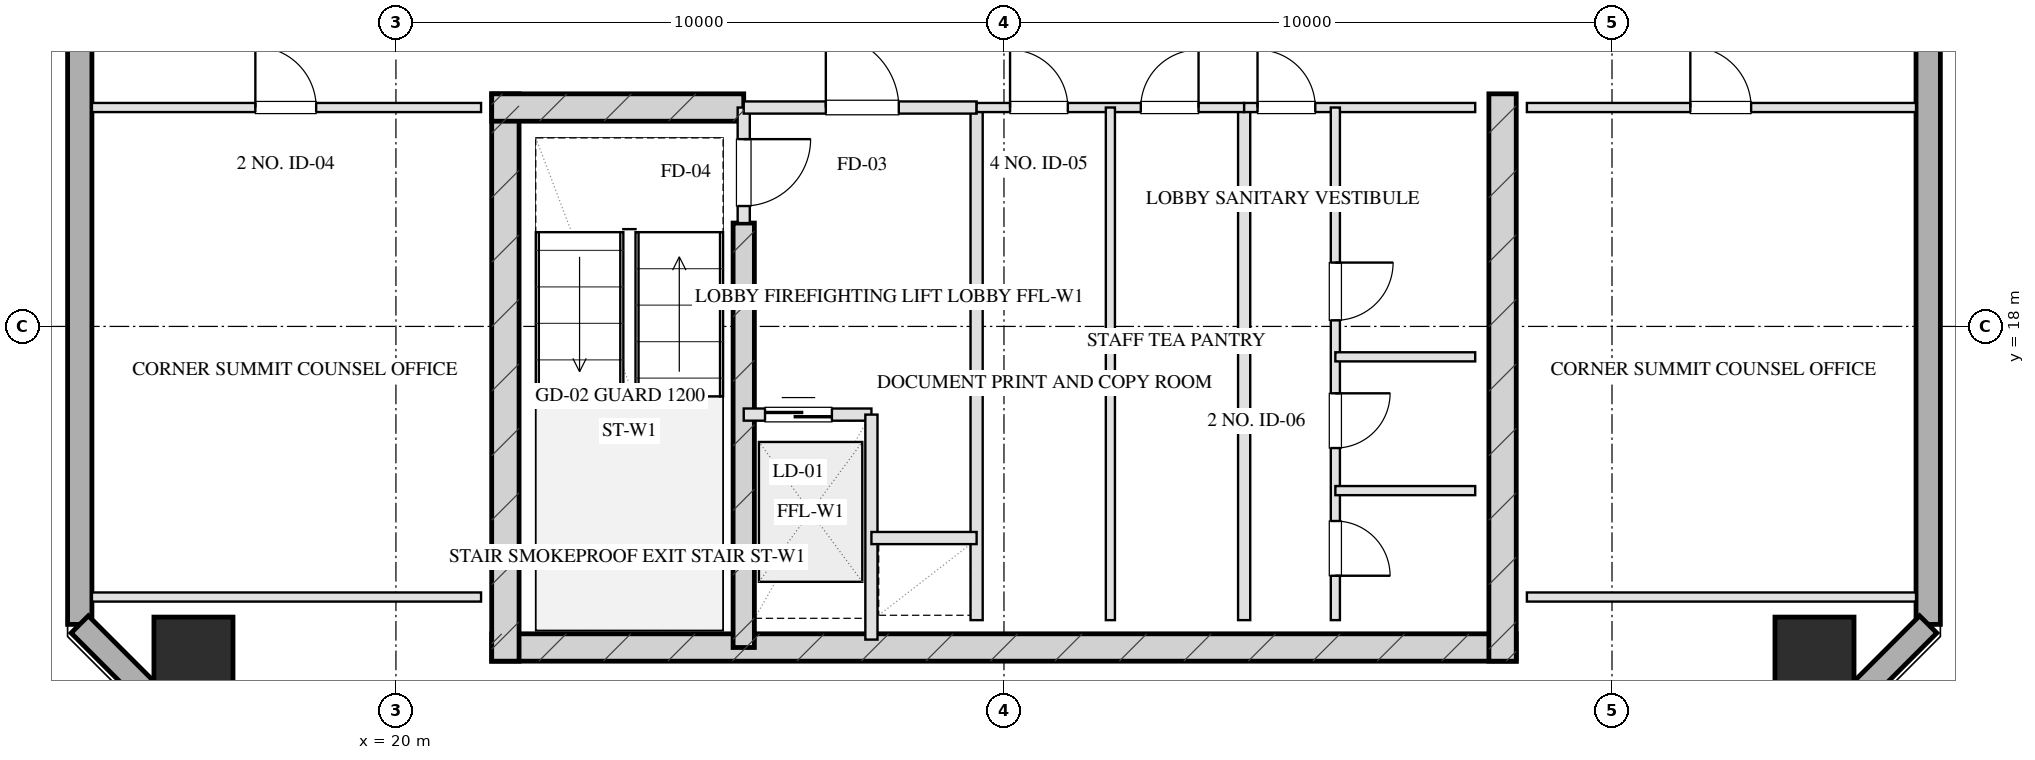
"""IFC4 building model, lengths in metres.
Left out: names, types, materials, properties, quantities, classifications, styles, units other than length and angle.
Written with IfcOpenShell. Run it as: python <this file> out.ifc"""

import sys

from ifc_helpers import new_model, si_unit, direction, frame, frame_2d, origin, origin_2d, place, context, subcontext, project, spatial, rectangle, hollow_rectangle, extrude, element, fill, save


model = new_model("IFC4")
c1 = context("Model", 3, precision=1e-05, world=origin(), true_north=direction((0.0, 1.0)))
c2 = subcontext(c1, "Body", "Model", "MODEL_VIEW")
j1 = project(units=[si_unit("LENGTHUNIT", "METRE"), si_unit("PLANEANGLEUNIT", "RADIAN")], contexts=[c1])
p1 = place(None, origin())
s1 = spatial("IfcSite", under=j1, at=p1, CompositionType="ELEMENT")
p2 = place(p1, origin())
s2 = spatial("IfcBuilding", under=s1, at=p2, CompositionType="ELEMENT")
p3 = place(p2, frame((0.0, 0.0, 260.0)))
s3 = spatial("IfcBuildingStorey", under=s2, at=p3, CompositionType="ELEMENT", Elevation=260.0)
p4 = place(p3, frame((21.575, 12.72, 0.0), z_axis=(0.0, 0.0, 1.0), x_axis=(1.0, 0.0, 0.0)))
e1 = element("IfcWall", 1, at=p4, inside=s3, PredefinedType="SHEAR", context=c2, shape_type="SweptSolid", body=[
    extrude(rectangle(XDim=16.85, YDim=0.45, at=frame_2d((8.425, 0.0))), origin(), (0.0, 0.0, 1.0), 3.2),
])
for number, where, z_axis, x_axis in (
    (2, (21.8, 21.825, 0.0), (0.0, 0.0, 1.0), (0.0, -1.0, 0.0)),
    (3, (38.2, 21.825, 0.0), (0.0, 0.0, 1.0), (0.0, -1.0, 0.0)),
):
    element("IfcWall", number, at=place(p3, frame(where, z_axis=z_axis, x_axis=x_axis)), inside=s3, PredefinedType="SHEAR", context=c2, shape_type="SweptSolid", body=[
        extrude(rectangle(XDim=9.33, YDim=0.45, at=frame_2d((4.665, 0.0))), origin(), (0.0, 0.0, 1.0), 3.2),
    ])
p5 = place(p3, frame((25.72, 19.7, 0.0), z_axis=(0.0, 0.0, 1.0), x_axis=(0.0, -1.0, 0.0)))
e4 = element("IfcWall", 4, at=p5, inside=s3, PredefinedType="SHEAR", context=c2, shape_type="SweptSolid", body=[
    extrude(rectangle(XDim=6.98, YDim=0.35, at=frame_2d((3.49, 0.0))), origin(), (0.0, 0.0, 1.0), 3.2),
])
p6 = place(p3, frame((21.575, 21.6, 0.0), z_axis=(0.0, 0.0, 1.0), x_axis=(1.0, 0.0, 0.0)))
e5 = element("IfcWall", 5, at=p6, inside=s3, PredefinedType="SHEAR", context=c2, shape_type="SweptSolid", body=[
    extrude(rectangle(XDim=4.145, YDim=0.45, at=frame_2d((2.073, 0.0))), origin(), (0.0, 0.0, 1.0), 3.2),
])
for number, where, z_axis, x_axis in (
    (6, (16.67, 12.57, 0.0), (0.0, 0.0, 1.0), (1.0, 0.0, 0.0)),
    (7, (43.33, 12.57, 0.0), (0.0, 0.0, 1.0), (1.0, 0.0, 0.0)),
):
    element("IfcColumn", number, at=place(p3, frame(where, z_axis=z_axis, x_axis=x_axis)), inside=s3, PredefinedType="COLUMN", context=c2, shape_type="SweptSolid", body=[
        extrude(hollow_rectangle(XDim=1.3, YDim=1.3, WallThickness=0.045, at=origin_2d()), origin(), (0.0, 0.0, 1.0), 3.201),
    ])
p7 = place(p3, frame((14.8, 13.1, 0.0), z_axis=(0.0, 0.0, 1.0), x_axis=(0.0, 1.0, 0.0)))
e8 = element("IfcWall", 8, at=p7, inside=s3, PredefinedType="SOLIDWALL", context=c2, shape_type="SweptSolid", body=[
    extrude(rectangle(XDim=41.8, YDim=0.4, at=frame_2d((20.9, 0.0))), origin(), (0.0, 0.0, 1.0), 2.36),
])
p8 = place(p7, frame((13.525, 0.0, 0.75)))
e9 = element("IfcOpeningElement", 9, at=p8, cuts=e8, PredefinedType="OPENING", context=c2, shape_type="SweptSolid", body=[
    extrude(rectangle(XDim=1.95, YDim=1.21, at=frame_2d((0.975, 0.605))), frame((0.0, 0.21, 0.0), z_axis=(0.0, -1.0, 0.0), x_axis=(1.0, 0.0, 0.0)), (0.0, 0.0, 1.0), 0.42),
])
p9 = place(p7, frame((17.325, 0.0, 0.75)))
e10 = element("IfcOpeningElement", 10, at=p9, cuts=e8, PredefinedType="OPENING", context=c2, shape_type="SweptSolid", body=[
    extrude(rectangle(XDim=1.95, YDim=1.21, at=frame_2d((0.975, 0.605))), frame((0.0, 0.21, 0.0), z_axis=(0.0, -1.0, 0.0), x_axis=(1.0, 0.0, 0.0)), (0.0, 0.0, 1.0), 0.42),
])
p10 = place(p7, frame((23.43, 0.0, 0.0)))
e11 = element("IfcOpeningElement", 11, at=p10, cuts=e8, PredefinedType="OPENING", context=c2, shape_type="SweptSolid", body=[
    extrude(rectangle(XDim=1.1, YDim=2.15, at=frame_2d((0.55, 1.075))), frame((0.0, 0.21, 0.0), z_axis=(0.0, -1.0, 0.0), x_axis=(1.0, 0.0, 0.0)), (0.0, 0.0, 1.0), 0.42),
])
p11 = place(p3, frame((45.2, 54.9, 0.0), z_axis=(0.0, 0.0, 1.0), x_axis=(0.0, -1.0, 0.0)))
e12 = element("IfcWall", 12, at=p11, inside=s3, PredefinedType="SOLIDWALL", context=c2, shape_type="SweptSolid", body=[
    extrude(rectangle(XDim=41.8, YDim=0.4, at=frame_2d((20.9, 0.0))), origin(), (0.0, 0.0, 1.0), 2.36),
])
p12 = place(p11, frame((26.325, 0.0, 0.75)))
e13 = element("IfcOpeningElement", 13, at=p12, cuts=e12, PredefinedType="OPENING", context=c2, shape_type="SweptSolid", body=[
    extrude(rectangle(XDim=1.95, YDim=1.21, at=frame_2d((0.975, 0.605))), frame((0.0, 0.21, 0.0), z_axis=(0.0, -1.0, 0.0), x_axis=(1.0, 0.0, 0.0)), (0.0, 0.0, 1.0), 0.42),
])
p13 = place(p11, frame((22.525, 0.0, 0.75)))
e14 = element("IfcOpeningElement", 14, at=p13, cuts=e12, PredefinedType="OPENING", context=c2, shape_type="SweptSolid", body=[
    extrude(rectangle(XDim=1.95, YDim=1.21, at=frame_2d((0.975, 0.605))), frame((0.0, 0.21, 0.0), z_axis=(0.0, -1.0, 0.0), x_axis=(1.0, 0.0, 0.0)), (0.0, 0.0, 1.0), 0.42),
])
p14 = place(p11, frame((17.25, 0.0, 0.0)))
e15 = element("IfcOpeningElement", 15, at=p14, cuts=e12, PredefinedType="OPENING", context=c2, shape_type="SweptSolid", body=[
    extrude(rectangle(XDim=1.1, YDim=2.15, at=frame_2d((0.55, 1.075))), frame((0.0, 0.21, 0.0), z_axis=(0.0, -1.0, 0.0), x_axis=(1.0, 0.0, 0.0)), (0.0, 0.0, 1.0), 0.42),
])
for number, where, z_axis, x_axis in (
    (16, (45.2, 13.1, 0.0), (0.0, 0.0, 1.0), (-0.707, -0.707, 0.0)),
    (17, (17.2, 10.7, 0.0), (0.0, 0.0, 1.0), (-0.707, 0.707, 0.0)),
):
    element("IfcWall", number, at=place(p3, frame(where, z_axis=z_axis, x_axis=x_axis)), inside=s3, PredefinedType="SOLIDWALL", context=c2, shape_type="SweptSolid", body=[
        extrude(rectangle(XDim=3.394, YDim=0.4, at=frame_2d((1.697, 0.0))), origin(), (0.0, 0.0, 1.0), 2.36),
    ])
p15 = place(p3, frame((25.72, 21.6, 0.0), z_axis=(0.0, 0.0, 1.0), x_axis=(0.0, -1.0, 0.0)))
e18 = element("IfcWall", 18, at=p15, inside=s3, PredefinedType="PARTITIONING", context=c2, shape_type="SweptSolid", body=[
    extrude(rectangle(XDim=1.9, YDim=0.2, at=frame_2d((0.95, 0.0))), origin(), (0.0, 0.0, 1.0), 2.925),
])
p16 = place(p15, frame((0.52, 0.0, 0.0)))
e19 = element("IfcOpeningElement", 19, at=p16, cuts=e18, PredefinedType="OPENING", context=c2, shape_type="SweptSolid", body=[
    extrude(rectangle(XDim=1.1, YDim=2.05, at=frame_2d((0.55, 1.025))), frame((0.0, 0.11, 0.0), z_axis=(0.0, -1.0, 0.0), x_axis=(1.0, 0.0, 0.0)), (0.0, 0.0, 1.0), 0.22),
])
p17 = place(p3, frame((29.55, 21.6, 0.0), z_axis=(0.0, 0.0, 1.0), x_axis=(0.0, -1.0, 0.0)))
e20 = element("IfcWall", 20, at=p17, inside=s3, PredefinedType="PARTITIONING", context=c2, shape_type="SweptSolid", body=[
    extrude(rectangle(XDim=8.43, YDim=0.2, at=frame_2d((4.215, 0.0))), origin(), (0.0, 0.0, 1.0), 2.925),
])
p18 = place(p3, frame((25.72, 21.6, 0.0), z_axis=(0.0, 0.0, 1.0), x_axis=(1.0, 0.0, 0.0)))
e21 = element("IfcWall", 21, at=p18, inside=s3, PredefinedType="PARTITIONING", context=c2, shape_type="SweptSolid", body=[
    extrude(rectangle(XDim=3.83, YDim=0.2, at=frame_2d((1.915, 0.0))), origin(), (0.0, 0.0, 1.0), 2.925),
])
p19 = place(p18, frame((1.35, 0.0, 0.0)))
e22 = element("IfcOpeningElement", 22, at=p19, cuts=e21, PredefinedType="OPENING", context=c2, shape_type="SweptSolid", body=[
    extrude(rectangle(XDim=1.2, YDim=2.05, at=frame_2d((0.6, 1.025))), frame((0.0, 0.11, 0.0), z_axis=(0.0, -1.0, 0.0), x_axis=(1.0, 0.0, 0.0)), (0.0, 0.0, 1.0), 0.22),
])
p20 = place(p3, frame((25.72, 16.55, 0.0), z_axis=(0.0, 0.0, 1.0), x_axis=(1.0, 0.0, 0.0)))
e23 = element("IfcWall", 23, at=p20, inside=s3, PredefinedType="PARTITIONING", context=c2, shape_type="SweptSolid", body=[
    extrude(rectangle(XDim=2.1, YDim=0.2, at=frame_2d((1.05, 0.0))), origin(), (0.0, 0.0, 1.0), 2.925),
])
p21 = place(p20, frame((0.35, 0.0, 0.0)))
e24 = element("IfcOpeningElement", 24, at=p21, cuts=e23, PredefinedType="OPENING", context=c2, shape_type="SweptSolid", body=[
    extrude(rectangle(XDim=1.1, YDim=2.05, at=frame_2d((0.55, 1.025))), frame((0.0, 0.11, 0.0), z_axis=(0.0, -1.0, 0.0), x_axis=(1.0, 0.0, 0.0)), (0.0, 0.0, 1.0), 0.22),
])
p22 = place(p3, frame((27.82, 16.55, 0.0), z_axis=(0.0, 0.0, 1.0), x_axis=(0.0, -1.0, 0.0)))
e25 = element("IfcWall", 25, at=p22, inside=s3, PredefinedType="PARTITIONING", context=c2, shape_type="SweptSolid", body=[
    extrude(rectangle(XDim=3.7, YDim=0.2, at=frame_2d((1.85, 0.0))), origin(), (0.0, 0.0, 1.0), 2.925),
])
p23 = place(p3, frame((27.82, 14.52, 0.0), z_axis=(0.0, 0.0, 1.0), x_axis=(1.0, 0.0, 0.0)))
e26 = element("IfcWall", 26, at=p23, inside=s3, PredefinedType="PARTITIONING", context=c2, shape_type="SweptSolid", body=[
    extrude(rectangle(XDim=1.73, YDim=0.2, at=frame_2d((0.865, 0.0))), origin(), (0.0, 0.0, 1.0), 2.925),
])
p24 = place(p3, frame((33.95, 21.6, 0.0), z_axis=(0.0, 0.0, 1.0), x_axis=(0.0, -1.0, 0.0)))
e27 = element("IfcWall", 27, at=p24, inside=s3, PredefinedType="PARTITIONING", context=c2, shape_type="SweptSolid", body=[
    extrude(rectangle(XDim=8.43, YDim=0.2, at=frame_2d((4.215, 0.0))), origin(), (0.0, 0.0, 1.0), 2.925),
])
p25 = place(p3, frame((29.55, 21.6, 0.0), z_axis=(0.0, 0.0, 1.0), x_axis=(1.0, 0.0, 0.0)))
e28 = element("IfcWall", 28, at=p25, inside=s3, PredefinedType="PARTITIONING", context=c2, shape_type="SweptSolid", body=[
    extrude(rectangle(XDim=4.4, YDim=0.15, at=frame_2d((2.2, 0.0))), origin(), (0.0, 0.0, 1.0), 2.925),
])
p26 = place(p25, frame((0.55, 0.0, 0.0)))
e29 = element("IfcOpeningElement", 29, at=p26, cuts=e28, PredefinedType="OPENING", context=c2, shape_type="SweptSolid", body=[
    extrude(rectangle(XDim=0.95, YDim=2.05, at=frame_2d((0.475, 1.025))), frame((0.0, 0.085, 0.0), z_axis=(0.0, -1.0, 0.0), x_axis=(1.0, 0.0, 0.0)), (0.0, 0.0, 1.0), 0.17),
])
p27 = place(p25, frame((2.7, 0.0, 0.0)))
e30 = element("IfcOpeningElement", 30, at=p27, cuts=e28, PredefinedType="OPENING", context=c2, shape_type="SweptSolid", body=[
    extrude(rectangle(XDim=0.95, YDim=2.05, at=frame_2d((0.475, 1.025))), frame((0.0, 0.085, 0.0), z_axis=(0.0, -1.0, 0.0), x_axis=(1.0, 0.0, 0.0)), (0.0, 0.0, 1.0), 0.17),
])
p28 = place(p3, frame((31.75, 21.6, 0.0), z_axis=(0.0, 0.0, 1.0), x_axis=(0.0, -1.0, 0.0)))
e31 = element("IfcWall", 31, at=p28, inside=s3, PredefinedType="PARTITIONING", context=c2, shape_type="SweptSolid", body=[
    extrude(rectangle(XDim=8.43, YDim=0.15, at=frame_2d((4.215, 0.0))), origin(), (0.0, 0.0, 1.0), 2.925),
])
p29 = place(p3, frame((33.95, 21.6, 0.0), z_axis=(0.0, 0.0, 1.0), x_axis=(1.0, 0.0, 0.0)))
e32 = element("IfcWall", 32, at=p29, inside=s3, PredefinedType="PARTITIONING", context=c2, shape_type="SweptSolid", body=[
    extrude(rectangle(XDim=3.8, YDim=0.15, at=frame_2d((1.9, 0.0))), origin(), (0.0, 0.0, 1.0), 2.925),
])
p30 = place(p29, frame((0.22, 0.0, 0.0)))
e33 = element("IfcOpeningElement", 33, at=p30, cuts=e32, PredefinedType="OPENING", context=c2, shape_type="SweptSolid", body=[
    extrude(rectangle(XDim=0.95, YDim=2.05, at=frame_2d((0.475, 1.025))), frame((0.0, 0.085, 0.0), z_axis=(0.0, -1.0, 0.0), x_axis=(1.0, 0.0, 0.0)), (0.0, 0.0, 1.0), 0.17),
])
p31 = place(p3, frame((35.45, 21.6, 0.0), z_axis=(0.0, 0.0, 1.0), x_axis=(0.0, -1.0, 0.0)))
e34 = element("IfcWall", 34, at=p31, inside=s3, PredefinedType="PARTITIONING", context=c2, shape_type="SweptSolid", body=[
    extrude(rectangle(XDim=8.43, YDim=0.15, at=frame_2d((4.215, 0.0))), origin(), (0.0, 0.0, 1.0), 2.565),
])
p32 = place(p31, frame((2.55, 0.0, 0.0)))
e35 = element("IfcOpeningElement", 35, at=p32, cuts=e34, PredefinedType="OPENING", context=c2, shape_type="SweptSolid", body=[
    extrude(rectangle(XDim=0.95, YDim=2.05, at=frame_2d((0.475, 1.025))), frame((0.0, 0.085, 0.0), z_axis=(0.0, -1.0, 0.0), x_axis=(1.0, 0.0, 0.0)), (0.0, 0.0, 1.0), 0.17),
])
p33 = place(p31, frame((4.7, 0.0, 0.0)))
e36 = element("IfcOpeningElement", 36, at=p33, cuts=e34, PredefinedType="OPENING", context=c2, shape_type="SweptSolid", body=[
    extrude(rectangle(XDim=0.9, YDim=2.05, at=frame_2d((0.45, 1.025))), frame((0.0, 0.085, 0.0), z_axis=(0.0, -1.0, 0.0), x_axis=(1.0, 0.0, 0.0)), (0.0, 0.0, 1.0), 0.17),
])
p34 = place(p31, frame((6.8, 0.0, 0.0)))
e37 = element("IfcOpeningElement", 37, at=p34, cuts=e34, PredefinedType="OPENING", context=c2, shape_type="SweptSolid", body=[
    extrude(rectangle(XDim=0.9, YDim=2.05, at=frame_2d((0.45, 1.025))), frame((0.0, 0.085, 0.0), z_axis=(0.0, -1.0, 0.0), x_axis=(1.0, 0.0, 0.0)), (0.0, 0.0, 1.0), 0.17),
])
for number, where, z_axis, x_axis in (
    (38, (35.45, 17.5, 0.0), (0.0, 0.0, 1.0), (1.0, 0.0, 0.0)),
    (39, (35.45, 15.3, 0.0), (0.0, 0.0, 1.0), (1.0, 0.0, 0.0)),
):
    element("IfcWall", number, at=place(p3, frame(where, z_axis=z_axis, x_axis=x_axis)), inside=s3, PredefinedType="PARTITIONING", context=c2, shape_type="SweptSolid", body=[
        extrude(rectangle(XDim=2.3, YDim=0.15, at=frame_2d((1.15, 0.0))), origin(), (0.0, 0.0, 1.0), 2.925),
    ])
p35 = place(p3, frame((15.0, 13.55, 0.0), z_axis=(0.0, 0.0, 1.0), x_axis=(1.0, 0.0, 0.0)))
e40 = element("IfcWall", 40, at=p35, inside=s3, PredefinedType="PARTITIONING", context=c2, shape_type="SweptSolid", body=[
    extrude(rectangle(XDim=6.4, YDim=0.15, at=frame_2d((3.2, 0.0))), origin(), (0.0, 0.0, 1.0), 2.925),
])
p36 = place(p3, frame((15.0, 21.6, 0.0), z_axis=(0.0, 0.0, 1.0), x_axis=(1.0, 0.0, 0.0)))
e41 = element("IfcWall", 41, at=p36, inside=s3, PredefinedType="PARTITIONING", context=c2, shape_type="SweptSolid", body=[
    extrude(rectangle(XDim=6.4, YDim=0.15, at=frame_2d((3.2, 0.0))), origin(), (0.0, 0.0, 1.0), 2.925),
])
p37 = place(p36, frame((2.688, 0.0, 0.0)))
e42 = element("IfcOpeningElement", 42, at=p37, cuts=e41, PredefinedType="OPENING", context=c2, shape_type="SweptSolid", body=[
    extrude(rectangle(XDim=1.0, YDim=2.05, at=frame_2d((0.5, 1.025))), frame((0.0, 0.085, 0.0), z_axis=(0.0, -1.0, 0.0), x_axis=(1.0, 0.0, 0.0)), (0.0, 0.0, 1.0), 0.17),
])
p38 = place(p3, frame((38.6, 13.55, 0.0), z_axis=(0.0, 0.0, 1.0), x_axis=(1.0, 0.0, 0.0)))
e43 = element("IfcWall", 43, at=p38, inside=s3, PredefinedType="PARTITIONING", context=c2, shape_type="SweptSolid", body=[
    extrude(rectangle(XDim=6.4, YDim=0.15, at=frame_2d((3.2, 0.0))), origin(), (0.0, 0.0, 1.0), 2.925),
])
p39 = place(p3, frame((38.6, 21.6, 0.0), z_axis=(0.0, 0.0, 1.0), x_axis=(1.0, 0.0, 0.0)))
e44 = element("IfcWall", 44, at=p39, inside=s3, PredefinedType="PARTITIONING", context=c2, shape_type="SweptSolid", body=[
    extrude(rectangle(XDim=6.4, YDim=0.15, at=frame_2d((3.2, 0.0))), origin(), (0.0, 0.0, 1.0), 2.925),
])
p40 = place(p39, frame((2.688, 0.0, 0.0)))
e45 = element("IfcOpeningElement", 45, at=p40, cuts=e44, PredefinedType="OPENING", context=c2, shape_type="SweptSolid", body=[
    extrude(rectangle(XDim=1.0, YDim=2.05, at=frame_2d((0.5, 1.025))), frame((0.0, 0.085, 0.0), z_axis=(0.0, -1.0, 0.0), x_axis=(1.0, 0.0, 0.0)), (0.0, 0.0, 1.0), 0.17),
])
p41 = place(p16, origin())
e46 = element("IfcDoor", 46, at=p41, inside=s3, OperationType="SINGLE_SWING_LEFT", PredefinedType="DOOR", context=c2, shape_type="SweptSolid", body=[
    extrude(rectangle(XDim=1.1, YDim=2.05, at=frame_2d((0.55, 1.025))), frame((0.0, 0.025, 0.0), z_axis=(0.0, -1.0, 0.0), x_axis=(1.0, 0.0, 0.0)), (0.0, 0.0, 1.0), 0.05),
])
fill(e19, e46)
p42 = place(p19, origin())
e47 = element("IfcDoor", 47, at=p42, inside=s3, OperationType="SINGLE_SWING_LEFT", PredefinedType="DOOR", context=c2, shape_type="SweptSolid", body=[
    extrude(rectangle(XDim=1.2, YDim=2.05, at=frame_2d((0.6, 1.025))), frame((0.0, 0.025, 0.0), z_axis=(0.0, -1.0, 0.0), x_axis=(1.0, 0.0, 0.0)), (0.0, 0.0, 1.0), 0.05),
])
fill(e22, e47)
p43 = place(p21, origin())
e48 = element("IfcDoor", 48, at=p43, inside=s3, OperationType="DOUBLE_DOOR_SLIDING", PredefinedType="DOOR", context=c2, shape_type="SweptSolid", body=[
    extrude(rectangle(XDim=1.1, YDim=2.05, at=frame_2d((0.55, 1.025))), frame((0.0, 0.025, 0.0), z_axis=(0.0, -1.0, 0.0), x_axis=(1.0, 0.0, 0.0)), (0.0, 0.0, 1.0), 0.05),
])
fill(e24, e48)
p44 = place(p26, origin())
e49 = element("IfcDoor", 49, at=p44, inside=s3, OperationType="SINGLE_SWING_LEFT", PredefinedType="DOOR", context=c2, shape_type="SweptSolid", body=[
    extrude(rectangle(XDim=0.95, YDim=2.05, at=frame_2d((0.475, 1.025))), frame((0.0, 0.025, 0.0), z_axis=(0.0, -1.0, 0.0), x_axis=(1.0, 0.0, 0.0)), (0.0, 0.0, 1.0), 0.05),
])
fill(e29, e49)
p45 = place(p27, origin())
e50 = element("IfcDoor", 50, at=p45, inside=s3, OperationType="SINGLE_SWING_RIGHT", PredefinedType="DOOR", context=c2, shape_type="SweptSolid", body=[
    extrude(rectangle(XDim=0.95, YDim=2.05, at=frame_2d((0.475, 1.025))), frame((0.0, 0.025, 0.0), z_axis=(0.0, -1.0, 0.0), x_axis=(1.0, 0.0, 0.0)), (0.0, 0.0, 1.0), 0.05),
])
fill(e30, e50)
p46 = place(p30, origin())
e51 = element("IfcDoor", 51, at=p46, inside=s3, OperationType="SINGLE_SWING_LEFT", PredefinedType="DOOR", context=c2, shape_type="SweptSolid", body=[
    extrude(rectangle(XDim=0.95, YDim=2.05, at=frame_2d((0.475, 1.025))), frame((0.0, 0.025, 0.0), z_axis=(0.0, -1.0, 0.0), x_axis=(1.0, 0.0, 0.0)), (0.0, 0.0, 1.0), 0.05),
])
fill(e33, e51)
p47 = place(p32, origin())
e52 = element("IfcDoor", 52, at=p47, inside=s3, OperationType="SINGLE_SWING_LEFT", PredefinedType="DOOR", context=c2, shape_type="SweptSolid", body=[
    extrude(rectangle(XDim=0.95, YDim=2.05, at=frame_2d((0.475, 1.025))), frame((0.0, 0.025, 0.0), z_axis=(0.0, -1.0, 0.0), x_axis=(1.0, 0.0, 0.0)), (0.0, 0.0, 1.0), 0.05),
])
fill(e35, e52)
p48 = place(p33, origin())
e53 = element("IfcDoor", 53, at=p48, inside=s3, OperationType="SINGLE_SWING_LEFT", PredefinedType="DOOR", context=c2, shape_type="SweptSolid", body=[
    extrude(rectangle(XDim=0.9, YDim=2.05, at=frame_2d((0.45, 1.025))), frame((0.0, 0.025, 0.0), z_axis=(0.0, -1.0, 0.0), x_axis=(1.0, 0.0, 0.0)), (0.0, 0.0, 1.0), 0.05),
])
fill(e36, e53)
p49 = place(p34, origin())
e54 = element("IfcDoor", 54, at=p49, inside=s3, OperationType="SINGLE_SWING_RIGHT", PredefinedType="DOOR", context=c2, shape_type="SweptSolid", body=[
    extrude(rectangle(XDim=0.9, YDim=2.05, at=frame_2d((0.45, 1.025))), frame((0.0, 0.025, 0.0), z_axis=(0.0, -1.0, 0.0), x_axis=(1.0, 0.0, 0.0)), (0.0, 0.0, 1.0), 0.05),
])
fill(e37, e54)
p50 = place(p37, origin())
e55 = element("IfcDoor", 55, at=p50, inside=s3, OperationType="SINGLE_SWING_LEFT", PredefinedType="DOOR", context=c2, shape_type="SweptSolid", body=[
    extrude(rectangle(XDim=1.0, YDim=2.05, at=frame_2d((0.5, 1.025))), frame((0.0, 0.025, 0.0), z_axis=(0.0, -1.0, 0.0), x_axis=(1.0, 0.0, 0.0)), (0.0, 0.0, 1.0), 0.05),
])
fill(e42, e55)
p51 = place(p40, origin())
e56 = element("IfcDoor", 56, at=p51, inside=s3, OperationType="SINGLE_SWING_LEFT", PredefinedType="DOOR", context=c2, shape_type="SweptSolid", body=[
    extrude(rectangle(XDim=1.0, YDim=2.05, at=frame_2d((0.5, 1.025))), frame((0.0, 0.025, 0.0), z_axis=(0.0, -1.0, 0.0), x_axis=(1.0, 0.0, 0.0)), (0.0, 0.0, 1.0), 0.05),
])
fill(e45, e56)
save(model, sys.argv[1])
